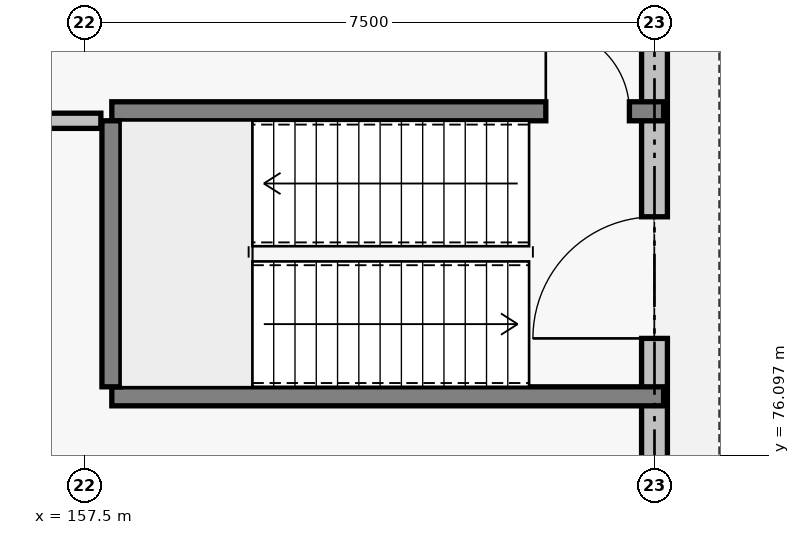
"""IFC4 building model, lengths in metres.
Left out: names, types, materials, properties, quantities, classifications, styles, units other than length and angle.
Written with IfcOpenShell. Run it as: python <this file> out.ifc"""

import sys

from ifc_helpers import new_model, si_unit, direction, frame, frame_2d, origin, place, context, subcontext, project, spatial, rectangle, extrude, element, fill, save


model = new_model("IFC4")
c1 = context("Model", 3, precision=1e-05, world=origin(), true_north=direction((0.0, 1.0)))
c2 = subcontext(c1, "Body", "Model", "MODEL_VIEW")
j1 = project(units=[si_unit("LENGTHUNIT", "METRE"), si_unit("PLANEANGLEUNIT", "RADIAN")], contexts=[c1])
p1 = place(None, origin())
s1 = spatial("IfcSite", under=j1, at=p1, CompositionType="ELEMENT")
p2 = place(p1, origin())
s2 = spatial("IfcBuilding", under=s1, at=p2, CompositionType="ELEMENT")
p3 = place(p2, origin())
s3 = spatial("IfcBuildingStorey", under=s2, at=p3, CompositionType="ELEMENT", Elevation=0.0)
p4 = place(p3, frame((165.0, 75.385, 0.0), z_axis=(0.0, 0.0, 1.0), x_axis=(0.0, 1.0, 0.0)))
e1 = element("IfcWall", 1, at=p4, inside=s3, PredefinedType="SOLIDWALL", context=c2, shape_type="SweptSolid", body=[
    extrude(rectangle(XDim=6.73, YDim=0.34, at=frame_2d((3.365, 0.0))), origin(), (0.0, 0.0, 1.0), 3.67),
])
p5 = place(p4, frame((2.252, 0.0, 0.0)))
e2 = element("IfcOpeningElement", 2, at=p5, cuts=e1, PredefinedType="OPENING", context=c2, shape_type="SweptSolid", body=[
    extrude(rectangle(XDim=1.6, YDim=2.15, at=frame_2d((0.8, 1.075))), frame((0.0, 0.18, 0.0), z_axis=(0.0, -1.0, 0.0), x_axis=(1.0, 0.0, 0.0)), (0.0, 0.0, 1.0), 0.36),
])
p6 = place(p3, frame((157.86, 76.875, 0.0), z_axis=(0.0, 0.0, 1.0), x_axis=(1.0, 0.0, 0.0)))
e3 = element("IfcWall", 3, at=p6, inside=s3, PredefinedType="SOLIDWALL", context=c2, shape_type="SweptSolid", body=[
    extrude(rectangle(XDim=7.26, YDim=0.25, at=frame_2d((3.63, 0.0))), origin(), (0.0, 0.0, 1.0), 4.5),
])
p7 = place(p3, frame((157.86, 80.625, 0.0), z_axis=(0.0, 0.0, 1.0), x_axis=(1.0, 0.0, 0.0)))
e4 = element("IfcWall", 4, at=p7, inside=s3, PredefinedType="SOLIDWALL", context=c2, shape_type="SweptSolid", body=[
    extrude(rectangle(XDim=7.26, YDim=0.25, at=frame_2d((3.63, 0.0))), origin(), (0.0, 0.0, 1.0), 4.5),
])
p8 = place(p7, frame((5.71, 0.0, 0.0)))
e5 = element("IfcOpeningElement", 5, at=p8, cuts=e4, PredefinedType="OPENING", context=c2, shape_type="SweptSolid", body=[
    extrude(rectangle(XDim=1.1, YDim=2.15, at=frame_2d((0.55, 1.075))), frame((0.0, 0.135, 0.0), z_axis=(0.0, -1.0, 0.0), x_axis=(1.0, 0.0, 0.0)), (0.0, 0.0, 1.0), 0.27),
])
p9 = place(p3, frame((157.855, 77.0, 0.0), z_axis=(0.0, 0.0, 1.0), x_axis=(0.0, 1.0, 0.0)))
e6 = element("IfcWall", 6, at=p9, inside=s3, PredefinedType="SOLIDWALL", context=c2, shape_type="SweptSolid", body=[
    extrude(rectangle(XDim=3.5, YDim=0.25, at=frame_2d((1.75, 0.0))), origin(), (0.0, 0.0, 1.0), 4.5),
])
p10 = place(p3, frame((154.5, 80.5, 0.0), z_axis=(0.0, 0.0, 1.0), x_axis=(1.0, 0.0, 0.0)))
e7 = element("IfcWall", 7, at=p10, inside=s3, PredefinedType="PARTITIONING", context=c2, shape_type="SweptSolid", body=[
    extrude(rectangle(XDim=3.216, YDim=0.2, at=frame_2d((1.608, 0.0))), origin(), (0.0, 0.0, 1.0), 3.87),
])
p11 = place(p5, frame((1.6, 0.0, 0.0), z_axis=(0.0, 0.0, 1.0), x_axis=(-1.0, 0.0, 0.0)))
e8 = element("IfcDoor", 8, at=p11, inside=s3, OperationType="SINGLE_SWING_RIGHT", PredefinedType="DOOR", context=c2, shape_type="SweptSolid", body=[
    extrude(rectangle(XDim=1.6, YDim=2.15, at=frame_2d((0.8, 1.075))), frame((0.0, 0.025, 0.0), z_axis=(0.0, -1.0, 0.0), x_axis=(1.0, 0.0, 0.0)), (0.0, 0.0, 1.0), 0.05),
])
fill(e2, e8)
p12 = place(p8, origin())
e9 = element("IfcDoor", 9, at=p12, inside=s3, OperationType="SINGLE_SWING_LEFT", PredefinedType="DOOR", context=c2, shape_type="SweptSolid", body=[
    extrude(rectangle(XDim=1.1, YDim=2.15, at=frame_2d((0.55, 1.075))), frame((0.0, 0.025, 0.0), z_axis=(0.0, -1.0, 0.0), x_axis=(1.0, 0.0, 0.0)), (0.0, 0.0, 1.0), 0.05),
])
fill(e5, e9)
save(model, sys.argv[1])
